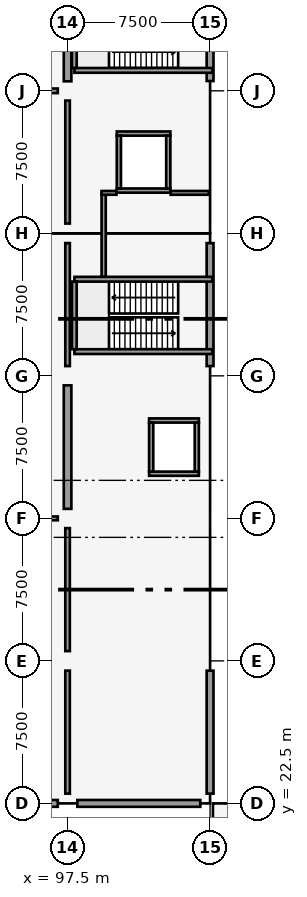
"""IFC4 building model, lengths in metres.
Left out: names, types, materials, properties, quantities, classifications, styles, units other than length and angle.
Written with IfcOpenShell. Run it as: python <this file> out.ifc"""

import sys

from ifc_helpers import new_model, si_unit, direction, frame, frame_2d, origin, origin_2d, place, context, subcontext, project, spatial, rectangle, extrude, element, fill, save


model = new_model("IFC4")
c1 = context("Model", 3, precision=1e-05, world=origin(), true_north=direction((0.0, 1.0)))
c2 = subcontext(c1, "Body", "Model", "MODEL_VIEW")
j1 = project(units=[si_unit("LENGTHUNIT", "METRE"), si_unit("PLANEANGLEUNIT", "RADIAN")], contexts=[c1])
p1 = place(None, origin())
s1 = spatial("IfcSite", under=j1, at=p1, CompositionType="ELEMENT")
p2 = place(p1, origin())
s2 = spatial("IfcBuilding", under=s1, at=p2, CompositionType="ELEMENT")
p3 = place(p2, origin())
s3 = spatial("IfcBuildingStorey", under=s2, at=p3, CompositionType="ELEMENT", Elevation=0.0)
for number, where, z_axis, x_axis in (
    (1, (97.5, 22.5, 0.0), (0.0, 0.0, 1.0), (1.0, 0.0, 0.0)),
    (2, (97.5, 30.0, 0.0), (0.0, 0.0, 1.0), (1.0, 0.0, 0.0)),
    (3, (97.5, 37.5, 0.0), (0.0, 0.0, 1.0), (1.0, 0.0, 0.0)),
    (4, (97.5, 45.0, 0.0), (0.0, 0.0, 1.0), (1.0, 0.0, 0.0)),
    (5, (97.5, 52.5, 0.0), (0.0, 0.0, 1.0), (1.0, 0.0, 0.0)),
    (6, (97.5, 60.0, 0.0), (0.0, 0.0, 1.0), (1.0, 0.0, 0.0)),
    (7, (105.0, 22.5, 0.0), (0.0, 0.0, 1.0), (1.0, 0.0, 0.0)),
    (8, (105.0, 30.0, 0.0), (0.0, 0.0, 1.0), (1.0, 0.0, 0.0)),
    (9, (105.0, 37.5, 0.0), (0.0, 0.0, 1.0), (1.0, 0.0, 0.0)),
    (10, (105.0, 45.0, 0.0), (0.0, 0.0, 1.0), (1.0, 0.0, 0.0)),
    (11, (105.0, 52.5, 0.0), (0.0, 0.0, 1.0), (1.0, 0.0, 0.0)),
    (12, (105.0, 60.0, 0.0), (0.0, 0.0, 1.0), (1.0, 0.0, 0.0)),
):
    element("IfcColumn", number, at=place(p3, frame(where, z_axis=z_axis, x_axis=x_axis)), inside=s3, PredefinedType="COLUMN", context=c2, shape_type="SweptSolid", body=[
        extrude(rectangle(XDim=1.0, YDim=1.0, at=origin_2d()), origin(), (0.0, 0.0, 1.0), 4.8),
    ])
for number, where, z_axis, x_axis in (
    (13, (97.5, 38.0, 0.0), (0.0, 0.0, 1.0), (0.0, 1.0, 0.0)),
    (14, (97.5, 60.5, 0.0), (0.0, 0.0, 1.0), (0.0, 1.0, 0.0)),
):
    element("IfcWall", number, at=place(p3, frame(where, z_axis=z_axis, x_axis=x_axis)), inside=s3, PredefinedType="SHEAR", context=c2, shape_type="SweptSolid", body=[
        extrude(rectangle(XDim=6.5, YDim=0.4, at=frame_2d((3.25, 0.0))), origin(), (0.0, 0.0, 1.0), 3.6),
    ])
p4 = place(p3, frame((90.465, 22.5, 0.0), z_axis=(0.0, 0.0, 1.0), x_axis=(1.0, 0.0, 0.0)))
e15 = element("IfcWall", 15, at=p4, inside=s3, PredefinedType="SOLIDWALL", context=c2, shape_type="SweptSolid", body=[
    extrude(rectangle(XDim=6.52, YDim=0.36, at=frame_2d((3.26, 0.0))), origin(), (0.0, 0.0, 1.0), 3.72),
])
p5 = place(p4, frame((2.285, 0.0, 0.0)))
e16 = element("IfcOpeningElement", 16, at=p5, cuts=e15, PredefinedType="OPENING", context=c2, shape_type="SweptSolid", body=[
    extrude(rectangle(XDim=2.0, YDim=2.2, at=frame_2d((1.0, 1.1))), frame((0.0, 0.19, 0.0), z_axis=(0.0, -1.0, 0.0), x_axis=(1.0, 0.0, 0.0)), (0.0, 0.0, 1.0), 0.38),
])
p6 = place(p3, frame((98.015, 22.5, 0.0), z_axis=(0.0, 0.0, 1.0), x_axis=(1.0, 0.0, 0.0)))
e17 = element("IfcWall", 17, at=p6, inside=s3, PredefinedType="SOLIDWALL", context=c2, shape_type="SweptSolid", body=[
    extrude(rectangle(XDim=6.47, YDim=0.36, at=frame_2d((3.235, 0.0))), origin(), (0.0, 0.0, 1.0), 3.72),
])
p7 = place(p6, frame((2.235, 0.0, 0.0)))
e18 = element("IfcOpeningElement", 18, at=p7, cuts=e17, PredefinedType="OPENING", context=c2, shape_type="SweptSolid", body=[
    extrude(rectangle(XDim=2.0, YDim=2.2, at=frame_2d((1.0, 1.1))), frame((0.0, 0.19, 0.0), z_axis=(0.0, -1.0, 0.0), x_axis=(1.0, 0.0, 0.0)), (0.0, 0.0, 1.0), 0.38),
])
p8 = place(p3, frame((105.0, 23.015, 0.0), z_axis=(0.0, 0.0, 1.0), x_axis=(0.0, 1.0, 0.0)))
e19 = element("IfcWall", 19, at=p8, inside=s3, PredefinedType="SOLIDWALL", context=c2, shape_type="SweptSolid", body=[
    extrude(rectangle(XDim=6.47, YDim=0.36, at=frame_2d((3.235, 0.0))), origin(), (0.0, 0.0, 1.0), 3.57),
])
p9 = place(p8, frame((1.12, 0.0, 0.6)))
e20 = element("IfcOpeningElement", 20, at=p9, cuts=e19, PredefinedType="OPENING", context=c2, shape_type="SweptSolid", body=[
    extrude(rectangle(XDim=1.1, YDim=1.8, at=frame_2d((0.55, 0.9))), frame((0.0, 0.19, 0.0), z_axis=(0.0, -1.0, 0.0), x_axis=(1.0, 0.0, 0.0)), (0.0, 0.0, 1.0), 0.38),
])
p10 = place(p8, frame((4.15, 0.0, 0.6)))
e21 = element("IfcOpeningElement", 21, at=p10, cuts=e19, PredefinedType="OPENING", context=c2, shape_type="SweptSolid", body=[
    extrude(rectangle(XDim=1.3, YDim=1.3, at=frame_2d((0.65, 0.65))), frame((0.0, 0.19, 0.0), z_axis=(0.0, -1.0, 0.0), x_axis=(1.0, 0.0, 0.0)), (0.0, 0.0, 1.0), 0.38),
])
p11 = place(p3, frame((105.0, 45.515, 0.0), z_axis=(0.0, 0.0, 1.0), x_axis=(0.0, 1.0, 0.0)))
e22 = element("IfcWall", 22, at=p11, inside=s3, PredefinedType="SOLIDWALL", context=c2, shape_type="SweptSolid", body=[
    extrude(rectangle(XDim=6.47, YDim=0.36, at=frame_2d((3.235, 0.0))), origin(), (0.0, 0.0, 1.0), 3.57),
])
p12 = place(p11, frame((2.022, 0.0, 0.0)))
e23 = element("IfcOpeningElement", 23, at=p12, cuts=e22, PredefinedType="OPENING", context=c2, shape_type="SweptSolid", body=[
    extrude(rectangle(XDim=1.8, YDim=2.2, at=frame_2d((0.9, 1.1))), frame((0.0, 0.19, 0.0), z_axis=(0.0, -1.0, 0.0), x_axis=(1.0, 0.0, 0.0)), (0.0, 0.0, 1.0), 0.38),
])
p13 = place(p3, frame((105.0, 60.515, 0.0), z_axis=(0.0, 0.0, 1.0), x_axis=(0.0, 1.0, 0.0)))
e24 = element("IfcWall", 24, at=p13, inside=s3, PredefinedType="SOLIDWALL", context=c2, shape_type="SweptSolid", body=[
    extrude(rectangle(XDim=6.47, YDim=0.36, at=frame_2d((3.235, 0.0))), origin(), (0.0, 0.0, 1.0), 3.57),
])
p14 = place(p13, frame((2.022, 0.0, 0.0)))
e25 = element("IfcOpeningElement", 25, at=p14, cuts=e24, PredefinedType="OPENING", context=c2, shape_type="SweptSolid", body=[
    extrude(rectangle(XDim=1.8, YDim=2.2, at=frame_2d((0.9, 1.1))), frame((0.0, 0.19, 0.0), z_axis=(0.0, -1.0, 0.0), x_axis=(1.0, 0.0, 0.0)), (0.0, 0.0, 1.0), 0.38),
])
p15 = place(p3, frame((97.86, 46.275, 0.0), z_axis=(0.0, 0.0, 1.0), x_axis=(1.0, 0.0, 0.0)))
e26 = element("IfcWall", 26, at=p15, inside=s3, PredefinedType="SOLIDWALL", context=c2, shape_type="SweptSolid", body=[
    extrude(rectangle(XDim=7.26, YDim=0.25, at=frame_2d((3.63, 0.0))), origin(), (0.0, 0.0, 1.0), 4.5),
])
p16 = place(p15, frame((5.54, 0.0, 0.0)))
e27 = element("IfcOpeningElement", 27, at=p16, cuts=e26, PredefinedType="OPENING", context=c2, shape_type="SweptSolid", body=[
    extrude(rectangle(XDim=1.1, YDim=2.15, at=frame_2d((0.55, 1.075))), frame((0.0, 0.135, 0.0), z_axis=(0.0, -1.0, 0.0), x_axis=(1.0, 0.0, 0.0)), (0.0, 0.0, 1.0), 0.27),
])
p17 = place(p3, frame((97.86, 50.085, 0.0), z_axis=(0.0, 0.0, 1.0), x_axis=(1.0, 0.0, 0.0)))
e28 = element("IfcWall", 28, at=p17, inside=s3, PredefinedType="SOLIDWALL", context=c2, shape_type="SweptSolid", body=[
    extrude(rectangle(XDim=7.26, YDim=0.25, at=frame_2d((3.63, 0.0))), origin(), (0.0, 0.0, 1.0), 4.5),
])
p18 = place(p17, frame((5.54, 0.0, 0.0)))
e29 = element("IfcOpeningElement", 29, at=p18, cuts=e28, PredefinedType="OPENING", context=c2, shape_type="SweptSolid", body=[
    extrude(rectangle(XDim=1.1, YDim=2.15, at=frame_2d((0.55, 1.075))), frame((0.0, 0.135, 0.0), z_axis=(0.0, -1.0, 0.0), x_axis=(1.0, 0.0, 0.0)), (0.0, 0.0, 1.0), 0.27),
])
p19 = place(p3, frame((97.855, 46.4, 0.0), z_axis=(0.0, 0.0, 1.0), x_axis=(0.0, 1.0, 0.0)))
e30 = element("IfcWall", 30, at=p19, inside=s3, PredefinedType="SOLIDWALL", context=c2, shape_type="SweptSolid", body=[
    extrude(rectangle(XDim=3.56, YDim=0.25, at=frame_2d((1.78, 0.0))), origin(), (0.0, 0.0, 1.0), 4.5),
])
p20 = place(p3, frame((97.86, 61.075, 0.0), z_axis=(0.0, 0.0, 1.0), x_axis=(1.0, 0.0, 0.0)))
e31 = element("IfcWall", 31, at=p20, inside=s3, PredefinedType="SOLIDWALL", context=c2, shape_type="SweptSolid", body=[
    extrude(rectangle(XDim=7.26, YDim=0.25, at=frame_2d((3.63, 0.0))), origin(), (0.0, 0.0, 1.0), 4.5),
])
p21 = place(p20, frame((5.54, 0.0, 0.0)))
e32 = element("IfcOpeningElement", 32, at=p21, cuts=e31, PredefinedType="OPENING", context=c2, shape_type="SweptSolid", body=[
    extrude(rectangle(XDim=1.1, YDim=2.15, at=frame_2d((0.55, 1.075))), frame((0.0, 0.135, 0.0), z_axis=(0.0, -1.0, 0.0), x_axis=(1.0, 0.0, 0.0)), (0.0, 0.0, 1.0), 0.27),
])
p22 = place(p3, frame((97.855, 61.2, 0.0), z_axis=(0.0, 0.0, 1.0), x_axis=(0.0, 1.0, 0.0)))
e33 = element("IfcWall", 33, at=p22, inside=s3, PredefinedType="SOLIDWALL", context=c2, shape_type="SweptSolid", body=[
    extrude(rectangle(XDim=3.56, YDim=0.25, at=frame_2d((1.78, 0.0))), origin(), (0.0, 0.0, 1.0), 4.5),
])
for number, where, z_axis, x_axis in (
    (34, (101.79, 39.85, 0.0), (0.0, 0.0, 1.0), (1.0, 0.0, 0.0)),
    (35, (101.79, 42.65, 0.0), (0.0, 0.0, 1.0), (1.0, 0.0, 0.0)),
):
    element("IfcWall", number, at=place(p3, frame(where, z_axis=z_axis, x_axis=x_axis)), inside=s3, PredefinedType="SOLIDWALL", context=c2, shape_type="SweptSolid", body=[
        extrude(rectangle(XDim=2.62, YDim=0.22, at=frame_2d((1.31, 0.0))), origin(), (0.0, 0.0, 1.0), 4.5),
    ])
p23 = place(p3, frame((101.9, 39.96, 0.0), z_axis=(0.0, 0.0, 1.0), x_axis=(0.0, 1.0, 0.0)))
e36 = element("IfcWall", 36, at=p23, inside=s3, PredefinedType="SOLIDWALL", context=c2, shape_type="SweptSolid", body=[
    extrude(rectangle(XDim=2.58, YDim=0.22, at=frame_2d((1.29, 0.0))), origin(), (0.0, 0.0, 1.0), 4.5),
])
p24 = place(p23, frame((0.79, 0.0, 0.0)))
e37 = element("IfcOpeningElement", 37, at=p24, cuts=e36, PredefinedType="OPENING", context=c2, shape_type="SweptSolid", body=[
    extrude(rectangle(XDim=1.0, YDim=2.15, at=frame_2d((0.5, 1.075))), frame((0.0, 0.12, 0.0), z_axis=(0.0, -1.0, 0.0), x_axis=(1.0, 0.0, 0.0)), (0.0, 0.0, 1.0), 0.24),
])
p25 = place(p3, frame((104.3, 39.96, 0.0), z_axis=(0.0, 0.0, 1.0), x_axis=(0.0, 1.0, 0.0)))
e38 = element("IfcWall", 38, at=p25, inside=s3, PredefinedType="SOLIDWALL", context=c2, shape_type="SweptSolid", body=[
    extrude(rectangle(XDim=2.58, YDim=0.22, at=frame_2d((1.29, 0.0))), origin(), (0.0, 0.0, 1.0), 4.5),
])
p26 = place(p3, frame((100.09, 54.75, 0.0), z_axis=(0.0, 0.0, 1.0), x_axis=(1.0, 0.0, 0.0)))
e39 = element("IfcWall", 39, at=p26, inside=s3, PredefinedType="SOLIDWALL", context=c2, shape_type="SweptSolid", body=[
    extrude(rectangle(XDim=2.82, YDim=0.22, at=frame_2d((1.41, 0.0))), origin(), (0.0, 0.0, 1.0), 4.5),
])
p27 = place(p26, frame((0.86, 0.0, 0.0)))
e40 = element("IfcOpeningElement", 40, at=p27, cuts=e39, PredefinedType="OPENING", context=c2, shape_type="SweptSolid", body=[
    extrude(rectangle(XDim=1.1, YDim=2.15, at=frame_2d((0.55, 1.075))), frame((0.0, 0.12, 0.0), z_axis=(0.0, -1.0, 0.0), x_axis=(1.0, 0.0, 0.0)), (0.0, 0.0, 1.0), 0.24),
])
p28 = place(p3, frame((100.09, 57.75, 0.0), z_axis=(0.0, 0.0, 1.0), x_axis=(1.0, 0.0, 0.0)))
e41 = element("IfcWall", 41, at=p28, inside=s3, PredefinedType="SOLIDWALL", context=c2, shape_type="SweptSolid", body=[
    extrude(rectangle(XDim=2.82, YDim=0.22, at=frame_2d((1.41, 0.0))), origin(), (0.0, 0.0, 1.0), 4.5),
])
for number, where, z_axis, x_axis in (
    (42, (100.2, 54.86, 0.0), (0.0, 0.0, 1.0), (0.0, 1.0, 0.0)),
    (43, (102.8, 54.86, 0.0), (0.0, 0.0, 1.0), (0.0, 1.0, 0.0)),
):
    element("IfcWall", number, at=place(p3, frame(where, z_axis=z_axis, x_axis=x_axis)), inside=s3, PredefinedType="SOLIDWALL", context=c2, shape_type="SweptSolid", body=[
        extrude(rectangle(XDim=2.78, YDim=0.22, at=frame_2d((1.39, 0.0))), origin(), (0.0, 0.0, 1.0), 4.5),
    ])
p29 = place(p3, frame((99.4, 50.22, 0.0), z_axis=(0.0, 0.0, 1.0), x_axis=(0.0, 1.0, 0.0)))
e44 = element("IfcWall", 44, at=p29, inside=s3, PredefinedType="SOLIDWALL", context=c2, shape_type="SweptSolid", body=[
    extrude(rectangle(XDim=4.41, YDim=0.22, at=frame_2d((2.205, 0.0))), origin(), (0.0, 0.0, 1.0), 4.5),
])
p30 = place(p29, frame((0.45, 0.0, 0.0)))
e45 = element("IfcOpeningElement", 45, at=p30, cuts=e44, PredefinedType="OPENING", context=c2, shape_type="SweptSolid", body=[
    extrude(rectangle(XDim=1.1, YDim=2.15, at=frame_2d((0.55, 1.075))), frame((0.0, 0.12, 0.0), z_axis=(0.0, -1.0, 0.0), x_axis=(1.0, 0.0, 0.0)), (0.0, 0.0, 1.0), 0.24),
])
p31 = place(p3, frame((99.29, 54.63, 0.0), z_axis=(0.0, 0.0, 1.0), x_axis=(1.0, 0.0, 0.0)))
e46 = element("IfcWall", 46, at=p31, inside=s3, PredefinedType="PARTITIONING", context=c2, shape_type="SweptSolid", body=[
    extrude(rectangle(XDim=0.785, YDim=0.2, at=frame_2d((0.393, 0.0))), origin(), (0.0, 0.0, 1.0), 4.48),
])
p32 = place(p3, frame((102.925, 54.63, 0.0), z_axis=(0.0, 0.0, 1.0), x_axis=(1.0, 0.0, 0.0)))
e47 = element("IfcWall", 47, at=p32, inside=s3, PredefinedType="PARTITIONING", context=c2, shape_type="SweptSolid", body=[
    extrude(rectangle(XDim=2.015, YDim=0.2, at=frame_2d((1.007, 0.0))), origin(), (0.0, 0.0, 1.0), 3.73),
])
p33 = place(p3, frame((90.464, 37.5, 0.0), z_axis=(0.0, 0.0, 1.0), x_axis=(1.0, 0.0, 0.0)))
e48 = element("IfcWall", 48, at=p33, inside=s3, PredefinedType="PARTITIONING", context=c2, shape_type="SweptSolid", body=[
    extrude(rectangle(XDim=6.522, YDim=0.2, at=frame_2d((3.261, 0.0))), origin(), (0.0, 0.0, 1.0), 2.97),
])
p34 = place(p33, frame((2.386, 0.0, 0.0)))
e49 = element("IfcOpeningElement", 49, at=p34, cuts=e48, PredefinedType="OPENING", context=c2, shape_type="SweptSolid", body=[
    extrude(rectangle(XDim=1.8, YDim=2.18, at=frame_2d((0.9, 1.09))), frame((0.0, 0.11, 0.0), z_axis=(0.0, -1.0, 0.0), x_axis=(1.0, 0.0, 0.0)), (0.0, 0.0, 1.0), 0.22),
])
p35 = place(p3, frame((90.464, 60.0, 0.0), z_axis=(0.0, 0.0, 1.0), x_axis=(1.0, 0.0, 0.0)))
e50 = element("IfcWall", 50, at=p35, inside=s3, PredefinedType="PARTITIONING", context=c2, shape_type="SweptSolid", body=[
    extrude(rectangle(XDim=6.522, YDim=0.24, at=frame_2d((3.261, 0.0))), origin(), (0.0, 0.0, 1.0), 2.97),
])
p36 = place(p35, frame((2.486, 0.0, 0.0)))
e51 = element("IfcOpeningElement", 51, at=p36, cuts=e50, PredefinedType="OPENING", context=c2, shape_type="SweptSolid", body=[
    extrude(rectangle(XDim=1.6, YDim=2.15, at=frame_2d((0.8, 1.075))), frame((0.0, 0.13, 0.0), z_axis=(0.0, -1.0, 0.0), x_axis=(1.0, 0.0, 0.0)), (0.0, 0.0, 1.0), 0.26),
])
p37 = place(p3, frame((97.5, 23.014, 0.0), z_axis=(0.0, 0.0, 1.0), x_axis=(0.0, 1.0, 0.0)))
e52 = element("IfcWall", 52, at=p37, inside=s3, PredefinedType="PARTITIONING", context=c2, shape_type="SweptSolid", body=[
    extrude(rectangle(XDim=6.472, YDim=0.24, at=frame_2d((3.236, 0.0))), origin(), (0.0, 0.0, 1.0), 3.57),
])
p38 = place(p37, frame((2.486, 0.0, 0.0)))
e53 = element("IfcOpeningElement", 53, at=p38, cuts=e52, PredefinedType="OPENING", context=c2, shape_type="SweptSolid", body=[
    extrude(rectangle(XDim=1.5, YDim=2.16, at=frame_2d((0.75, 1.08))), frame((0.0, 0.13, 0.0), z_axis=(0.0, -1.0, 0.0), x_axis=(1.0, 0.0, 0.0)), (0.0, 0.0, 1.0), 0.26),
])
p39 = place(p3, frame((97.5, 30.514, 0.0), z_axis=(0.0, 0.0, 1.0), x_axis=(0.0, 1.0, 0.0)))
e54 = element("IfcWall", 54, at=p39, inside=s3, PredefinedType="PARTITIONING", context=c2, shape_type="SweptSolid", body=[
    extrude(rectangle(XDim=6.472, YDim=0.24, at=frame_2d((3.236, 0.0))), origin(), (0.0, 0.0, 1.0), 3.57),
])
p40 = place(p39, frame((2.336, 0.0, 0.0)))
e55 = element("IfcOpeningElement", 55, at=p40, cuts=e54, PredefinedType="OPENING", context=c2, shape_type="SweptSolid", body=[
    extrude(rectangle(XDim=1.8, YDim=2.16, at=frame_2d((0.9, 1.08))), frame((0.0, 0.13, 0.0), z_axis=(0.0, -1.0, 0.0), x_axis=(1.0, 0.0, 0.0)), (0.0, 0.0, 1.0), 0.26),
])
p41 = place(p3, frame((97.5, 45.514, 0.0), z_axis=(0.0, 0.0, 1.0), x_axis=(0.0, 1.0, 0.0)))
e56 = element("IfcWall", 56, at=p41, inside=s3, PredefinedType="PARTITIONING", context=c2, shape_type="SweptSolid", body=[
    extrude(rectangle(XDim=6.472, YDim=0.24, at=frame_2d((3.236, 0.0))), origin(), (0.0, 0.0, 1.0), 3.57),
])
p42 = place(p3, frame((97.5, 53.014, 0.0), z_axis=(0.0, 0.0, 1.0), x_axis=(0.0, 1.0, 0.0)))
e57 = element("IfcWall", 57, at=p42, inside=s3, PredefinedType="PARTITIONING", context=c2, shape_type="SweptSolid", body=[
    extrude(rectangle(XDim=6.472, YDim=0.24, at=frame_2d((3.236, 0.0))), origin(), (0.0, 0.0, 1.0), 3.57),
])
p43 = place(p42, frame((2.436, 0.0, 0.0)))
e58 = element("IfcOpeningElement", 58, at=p43, cuts=e57, PredefinedType="OPENING", context=c2, shape_type="SweptSolid", body=[
    extrude(rectangle(XDim=1.6, YDim=2.15, at=frame_2d((0.8, 1.075))), frame((0.0, 0.13, 0.0), z_axis=(0.0, -1.0, 0.0), x_axis=(1.0, 0.0, 0.0)), (0.0, 0.0, 1.0), 0.26),
])
p44 = place(p7, frame((2.0, 0.0, 0.0), z_axis=(0.0, 0.0, 1.0), x_axis=(-1.0, 0.0, 0.0)))
e59 = element("IfcDoor", 59, at=p44, inside=s3, OperationType="SINGLE_SWING_LEFT", PredefinedType="DOOR", context=c2, shape_type="SweptSolid", body=[
    extrude(rectangle(XDim=2.0, YDim=2.2, at=frame_2d((1.0, 1.1))), frame((0.0, 0.025, 0.0), z_axis=(0.0, -1.0, 0.0), x_axis=(1.0, 0.0, 0.0)), (0.0, 0.0, 1.0), 0.05),
])
fill(e18, e59)
p45 = place(p9, origin())
e60 = element("IfcWindow", 60, at=p45, inside=s3, PartitioningType="SINGLE_PANEL", PredefinedType="WINDOW", context=c2, shape_type="SweptSolid", body=[
    extrude(rectangle(XDim=1.1, YDim=1.8, at=frame_2d((0.55, 0.9))), frame((0.0, 0.03, 0.0), z_axis=(0.0, -1.0, 0.0), x_axis=(1.0, 0.0, 0.0)), (0.0, 0.0, 1.0), 0.06),
])
fill(e20, e60)
p46 = place(p10, origin())
e61 = element("IfcWindow", 61, at=p46, inside=s3, PartitioningType="SINGLE_PANEL", PredefinedType="WINDOW", context=c2, shape_type="SweptSolid", body=[
    extrude(rectangle(XDim=1.3, YDim=1.3, at=frame_2d((0.65, 0.65))), frame((0.0, 0.03, 0.0), z_axis=(0.0, -1.0, 0.0), x_axis=(1.0, 0.0, 0.0)), (0.0, 0.0, 1.0), 0.06),
])
fill(e21, e61)
p47 = place(p12, frame((1.8, 0.0, 0.0), z_axis=(0.0, 0.0, 1.0), x_axis=(-1.0, 0.0, 0.0)))
e62 = element("IfcDoor", 62, at=p47, inside=s3, OperationType="SINGLE_SWING_LEFT", PredefinedType="DOOR", context=c2, shape_type="SweptSolid", body=[
    extrude(rectangle(XDim=1.8, YDim=2.2, at=frame_2d((0.9, 1.1))), frame((0.0, 0.025, 0.0), z_axis=(0.0, -1.0, 0.0), x_axis=(1.0, 0.0, 0.0)), (0.0, 0.0, 1.0), 0.05),
])
fill(e23, e62)
p48 = place(p16, origin())
e63 = element("IfcDoor", 63, at=p48, inside=s3, OperationType="SINGLE_SWING_LEFT", PredefinedType="DOOR", context=c2, shape_type="SweptSolid", body=[
    extrude(rectangle(XDim=1.1, YDim=2.15, at=frame_2d((0.55, 1.075))), frame((0.0, 0.025, 0.0), z_axis=(0.0, -1.0, 0.0), x_axis=(1.0, 0.0, 0.0)), (0.0, 0.0, 1.0), 0.05),
])
fill(e27, e63)
p49 = place(p18, frame((1.1, 0.0, 0.0), z_axis=(0.0, 0.0, 1.0), x_axis=(-1.0, 0.0, 0.0)))
e64 = element("IfcDoor", 64, at=p49, inside=s3, OperationType="SINGLE_SWING_RIGHT", PredefinedType="DOOR", context=c2, shape_type="SweptSolid", body=[
    extrude(rectangle(XDim=1.1, YDim=2.15, at=frame_2d((0.55, 1.075))), frame((0.0, 0.025, 0.0), z_axis=(0.0, -1.0, 0.0), x_axis=(1.0, 0.0, 0.0)), (0.0, 0.0, 1.0), 0.05),
])
fill(e29, e64)
p50 = place(p21, origin())
e65 = element("IfcDoor", 65, at=p50, inside=s3, OperationType="SINGLE_SWING_LEFT", PredefinedType="DOOR", context=c2, shape_type="SweptSolid", body=[
    extrude(rectangle(XDim=1.1, YDim=2.15, at=frame_2d((0.55, 1.075))), frame((0.0, 0.025, 0.0), z_axis=(0.0, -1.0, 0.0), x_axis=(1.0, 0.0, 0.0)), (0.0, 0.0, 1.0), 0.05),
])
fill(e32, e65)
p51 = place(p24, origin())
e66 = element("IfcDoor", 66, at=p51, inside=s3, OperationType="SLIDING_TO_LEFT", PredefinedType="DOOR", context=c2, shape_type="SweptSolid", body=[
    extrude(rectangle(XDim=1.0, YDim=2.15, at=frame_2d((0.5, 1.075))), frame((0.0, 0.025, 0.0), z_axis=(0.0, -1.0, 0.0), x_axis=(1.0, 0.0, 0.0)), (0.0, 0.0, 1.0), 0.05),
])
fill(e37, e66)
p52 = place(p27, origin())
e67 = element("IfcDoor", 67, at=p52, inside=s3, OperationType="SLIDING_TO_LEFT", PredefinedType="DOOR", context=c2, shape_type="SweptSolid", body=[
    extrude(rectangle(XDim=1.1, YDim=2.15, at=frame_2d((0.55, 1.075))), frame((0.0, 0.025, 0.0), z_axis=(0.0, -1.0, 0.0), x_axis=(1.0, 0.0, 0.0)), (0.0, 0.0, 1.0), 0.05),
])
fill(e40, e67)
p53 = place(p30, origin())
e68 = element("IfcDoor", 68, at=p53, inside=s3, OperationType="SINGLE_SWING_LEFT", PredefinedType="DOOR", context=c2, shape_type="SweptSolid", body=[
    extrude(rectangle(XDim=1.1, YDim=2.15, at=frame_2d((0.55, 1.075))), frame((0.0, 0.025, 0.0), z_axis=(0.0, -1.0, 0.0), x_axis=(1.0, 0.0, 0.0)), (0.0, 0.0, 1.0), 0.05),
])
fill(e45, e68)
p54 = place(p38, origin())
e69 = element("IfcDoor", 69, at=p54, inside=s3, OperationType="SINGLE_SWING_RIGHT", PredefinedType="DOOR", context=c2, shape_type="SweptSolid", body=[
    extrude(rectangle(XDim=1.5, YDim=2.16, at=frame_2d((0.75, 1.08))), frame((0.0, 0.025, 0.0), z_axis=(0.0, -1.0, 0.0), x_axis=(1.0, 0.0, 0.0)), (0.0, 0.0, 1.0), 0.05),
])
fill(e53, e69)
p55 = place(p40, origin())
e70 = element("IfcDoor", 70, at=p55, inside=s3, OperationType="SINGLE_SWING_LEFT", PredefinedType="DOOR", context=c2, shape_type="SweptSolid", body=[
    extrude(rectangle(XDim=1.8, YDim=2.16, at=frame_2d((0.9, 1.08))), frame((0.0, 0.025, 0.0), z_axis=(0.0, -1.0, 0.0), x_axis=(1.0, 0.0, 0.0)), (0.0, 0.0, 1.0), 0.05),
])
fill(e55, e70)
p56 = place(p43, origin())
e71 = element("IfcDoor", 71, at=p56, inside=s3, OperationType="SINGLE_SWING_RIGHT", PredefinedType="DOOR", context=c2, shape_type="SweptSolid", body=[
    extrude(rectangle(XDim=1.6, YDim=2.15, at=frame_2d((0.8, 1.075))), frame((0.0, 0.025, 0.0), z_axis=(0.0, -1.0, 0.0), x_axis=(1.0, 0.0, 0.0)), (0.0, 0.0, 1.0), 0.05),
])
fill(e58, e71)
save(model, sys.argv[1])
